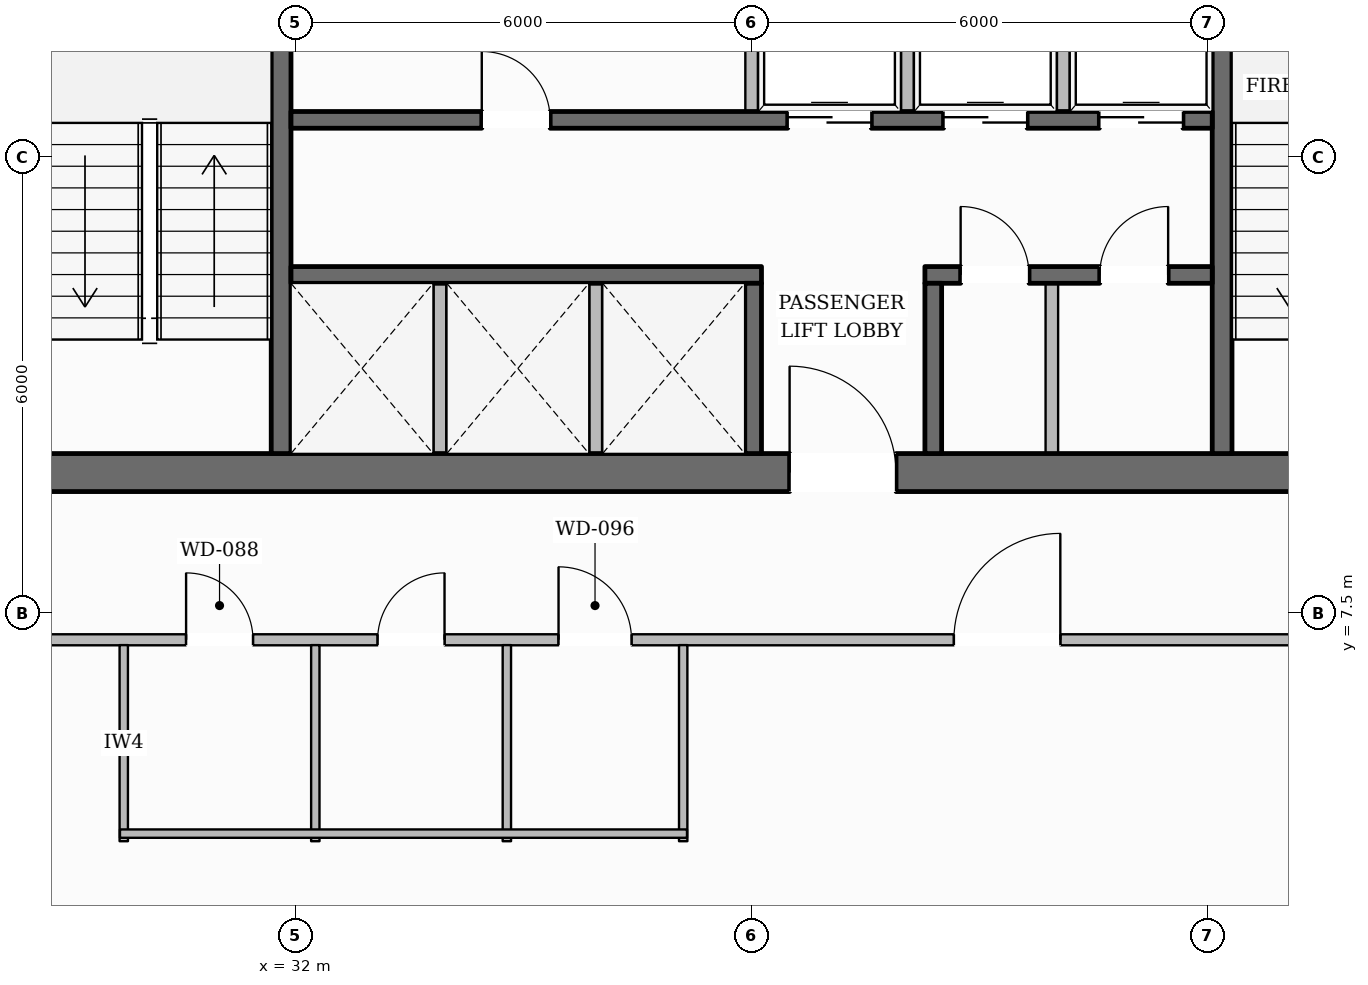
"""IFC4 building model, lengths in metres.
Left out: names, types, materials, properties, quantities, classifications, styles, units other than length and angle.
Written with IfcOpenShell. Run it as: python <this file> out.ifc"""

import sys

from ifc_helpers import new_model, si_unit, direction, frame, frame_2d, origin, place, context, subcontext, project, spatial, rectangle, extrude, element, fill, save


model = new_model("IFC4")
c1 = context("Model", 3, precision=1e-05, world=origin(), true_north=direction((0.0, 1.0)))
c2 = subcontext(c1, "Body", "Model", "MODEL_VIEW")
j1 = project(units=[si_unit("LENGTHUNIT", "METRE"), si_unit("PLANEANGLEUNIT", "RADIAN")], contexts=[c1])
p1 = place(None, origin())
s1 = spatial("IfcSite", under=j1, at=p1, CompositionType="ELEMENT")
p2 = place(p1, origin())
s2 = spatial("IfcBuilding", under=s1, at=p2, CompositionType="ELEMENT")
p3 = place(p2, frame((0.0, 0.0, 89.35)))
s3 = spatial("IfcBuildingStorey", under=s2, at=p3, CompositionType="ELEMENT", Elevation=89.35)
p4 = place(p3, frame((27.98, 9.35, 0.0), z_axis=(0.0, 0.0, 1.0), x_axis=(1.0, 0.0, 0.0)))
e1 = element("IfcWall", 1, at=p4, inside=s3, PredefinedType="SOLIDWALL", context=c2, shape_type="SweptSolid", body=[
    extrude(rectangle(XDim=20.04, YDim=0.5, at=frame_2d((10.02, 0.0))), origin(), (0.0, 0.0, 1.0), 3.6),
])
p5 = place(p4, frame((10.52, 0.0, 0.0)))
e2 = element("IfcOpeningElement", 2, at=p5, cuts=e1, PredefinedType="OPENING", context=c2, shape_type="SweptSolid", body=[
    extrude(rectangle(XDim=1.4, YDim=2.2, at=frame_2d((0.7, 1.1))), frame((0.0, 0.26, 0.0), z_axis=(0.0, -1.0, 0.0), x_axis=(1.0, 0.0, 0.0)), (0.0, 0.0, 1.0), 0.52),
])
p6 = place(p3, frame((31.81, 9.6, 0.0), z_axis=(0.0, 0.0, 1.0), x_axis=(0.0, 1.0, 0.0)))
e3 = element("IfcWall", 3, at=p6, inside=s3, PredefinedType="SHEAR", context=c2, shape_type="SweptSolid", body=[
    extrude(rectangle(XDim=13.0, YDim=0.26, at=frame_2d((6.5, 0.0))), origin(), (0.0, 0.0, 1.0), 3.6),
])
p7 = place(p6, frame((10.925, 0.0, 0.0)))
e4 = element("IfcOpeningElement", 4, at=p7, cuts=e3, PredefinedType="OPENING", context=c2, shape_type="SweptSolid", body=[
    extrude(rectangle(XDim=1.25, YDim=2.25, at=frame_2d((0.625, 1.125))), frame((0.0, 0.14, 0.0), z_axis=(0.0, -1.0, 0.0), x_axis=(1.0, 0.0, 0.0)), (0.0, 0.0, 1.0), 0.28),
])
p8 = place(p3, frame((44.19, 9.6, 0.0), z_axis=(0.0, 0.0, 1.0), x_axis=(0.0, 1.0, 0.0)))
e5 = element("IfcWall", 5, at=p8, inside=s3, PredefinedType="SHEAR", context=c2, shape_type="SweptSolid", body=[
    extrude(rectangle(XDim=13.0, YDim=0.26, at=frame_2d((6.5, 0.0))), origin(), (0.0, 0.0, 1.0), 3.6),
])
p9 = place(p8, frame((10.925, 0.0, 0.0)))
e6 = element("IfcOpeningElement", 6, at=p9, cuts=e5, PredefinedType="OPENING", context=c2, shape_type="SweptSolid", body=[
    extrude(rectangle(XDim=1.25, YDim=2.25, at=frame_2d((0.625, 1.125))), frame((0.0, 0.14, 0.0), z_axis=(0.0, -1.0, 0.0), x_axis=(1.0, 0.0, 0.0)), (0.0, 0.0, 1.0), 0.28),
])
p10 = place(p3, frame((31.94, 13.99, 0.0), z_axis=(0.0, 0.0, 1.0), x_axis=(1.0, 0.0, 0.0)))
e7 = element("IfcWall", 7, at=p10, inside=s3, PredefinedType="SOLIDWALL", context=c2, shape_type="SweptSolid", body=[
    extrude(rectangle(XDim=12.12, YDim=0.22, at=frame_2d((6.06, 0.0))), origin(), (0.0, 0.0, 1.0), 3.6),
])
p11 = place(p10, frame((2.51, 0.0, 0.0)))
e8 = element("IfcOpeningElement", 8, at=p11, cuts=e7, PredefinedType="OPENING", context=c2, shape_type="SweptSolid", body=[
    extrude(rectangle(XDim=0.9, YDim=2.1, at=frame_2d((0.45, 1.05))), frame((0.0, 0.12, 0.0), z_axis=(0.0, -1.0, 0.0), x_axis=(1.0, 0.0, 0.0)), (0.0, 0.0, 1.0), 0.24),
])
p12 = place(p10, frame((6.535, 0.0, 0.0)))
e9 = element("IfcOpeningElement", 9, at=p12, cuts=e7, PredefinedType="OPENING", context=c2, shape_type="SweptSolid", body=[
    extrude(rectangle(XDim=1.1, YDim=2.2, at=frame_2d((0.55, 1.1))), frame((0.0, 0.12, 0.0), z_axis=(0.0, -1.0, 0.0), x_axis=(1.0, 0.0, 0.0)), (0.0, 0.0, 1.0), 0.24),
])
p13 = place(p10, frame((8.585, 0.0, 0.0)))
e10 = element("IfcOpeningElement", 10, at=p13, cuts=e7, PredefinedType="OPENING", context=c2, shape_type="SweptSolid", body=[
    extrude(rectangle(XDim=1.1, YDim=2.2, at=frame_2d((0.55, 1.1))), frame((0.0, 0.12, 0.0), z_axis=(0.0, -1.0, 0.0), x_axis=(1.0, 0.0, 0.0)), (0.0, 0.0, 1.0), 0.24),
])
p14 = place(p10, frame((10.635, 0.0, 0.0)))
e11 = element("IfcOpeningElement", 11, at=p14, cuts=e7, PredefinedType="OPENING", context=c2, shape_type="SweptSolid", body=[
    extrude(rectangle(XDim=1.1, YDim=2.2, at=frame_2d((0.55, 1.1))), frame((0.0, 0.12, 0.0), z_axis=(0.0, -1.0, 0.0), x_axis=(1.0, 0.0, 0.0)), (0.0, 0.0, 1.0), 0.24),
])
p15 = place(p3, frame((31.94, 11.95, 0.0), z_axis=(0.0, 0.0, 1.0), x_axis=(1.0, 0.0, 0.0)))
e12 = element("IfcWall", 12, at=p15, inside=s3, PredefinedType="SOLIDWALL", context=c2, shape_type="SweptSolid", body=[
    extrude(rectangle(XDim=6.19, YDim=0.22, at=frame_2d((3.095, 0.0))), origin(), (0.0, 0.0, 1.0), 3.6),
])
p16 = place(p3, frame((40.28, 11.95, 0.0), z_axis=(0.0, 0.0, 1.0), x_axis=(1.0, 0.0, 0.0)))
e13 = element("IfcWall", 13, at=p16, inside=s3, PredefinedType="SOLIDWALL", context=c2, shape_type="SweptSolid", body=[
    extrude(rectangle(XDim=3.78, YDim=0.22, at=frame_2d((1.89, 0.0))), origin(), (0.0, 0.0, 1.0), 3.6),
])
p17 = place(p16, frame((0.47, 0.0, 0.0)))
e14 = element("IfcOpeningElement", 14, at=p17, cuts=e13, PredefinedType="OPENING", context=c2, shape_type="SweptSolid", body=[
    extrude(rectangle(XDim=0.9, YDim=2.1, at=frame_2d((0.45, 1.05))), frame((0.0, 0.12, 0.0), z_axis=(0.0, -1.0, 0.0), x_axis=(1.0, 0.0, 0.0)), (0.0, 0.0, 1.0), 0.24),
])
p18 = place(p16, frame((2.3, 0.0, 0.0)))
e15 = element("IfcOpeningElement", 15, at=p18, cuts=e13, PredefinedType="OPENING", context=c2, shape_type="SweptSolid", body=[
    extrude(rectangle(XDim=0.9, YDim=2.1, at=frame_2d((0.45, 1.05))), frame((0.0, 0.12, 0.0), z_axis=(0.0, -1.0, 0.0), x_axis=(1.0, 0.0, 0.0)), (0.0, 0.0, 1.0), 0.24),
])
for number, where, z_axis, x_axis in (
    (16, (38.02, 9.6, 0.0), (0.0, 0.0, 1.0), (0.0, 1.0, 0.0)),
    (17, (40.39, 9.6, 0.0), (0.0, 0.0, 1.0), (0.0, 1.0, 0.0)),
):
    element("IfcWall", number, at=place(p3, frame(where, z_axis=z_axis, x_axis=x_axis)), inside=s3, PredefinedType="SOLIDWALL", context=c2, shape_type="SweptSolid", body=[
        extrude(rectangle(XDim=2.24, YDim=0.22, at=frame_2d((1.12, 0.0))), origin(), (0.0, 0.0, 1.0), 3.6),
    ])
p19 = place(p3, frame((13.926, 13.506, 0.0), z_axis=(0.0, 0.0, 1.0), x_axis=(0.496286611319, 0.868158740914, 0.0)))
e18 = element("IfcWall", 18, at=p19, inside=s3, PredefinedType="STANDARD", context=c2, shape_type="SweptSolid", body=[
    extrude(rectangle(XDim=35.785, YDim=0.38, at=frame_2d((17.893, 0.0))), origin(), (0.0, 0.0, 1.0), 3.059),
])
p20 = place(p19, frame((31.63, 0.0, 0.65)))
e19 = element("IfcOpeningElement", 19, at=p20, cuts=e18, PredefinedType="OPENING", context=c2, shape_type="SweptSolid", body=[
    extrude(rectangle(XDim=1.55, YDim=1.75, at=frame_2d((0.775, 0.875))), frame((0.0, 0.2, 0.0), z_axis=(0.0, -1.0, 0.0), x_axis=(1.0, 0.0, 0.0)), (0.0, 0.0, 1.0), 0.4),
])
p21 = place(p19, frame((25.824, 0.0, 0.65)))
e20 = element("IfcOpeningElement", 20, at=p21, cuts=e18, PredefinedType="OPENING", context=c2, shape_type="SweptSolid", body=[
    extrude(rectangle(XDim=1.55, YDim=1.75, at=frame_2d((0.775, 0.875))), frame((0.0, 0.2, 0.0), z_axis=(0.0, -1.0, 0.0), x_axis=(1.0, 0.0, 0.0)), (0.0, 0.0, 1.0), 0.4),
])
p22 = place(p19, frame((20.018, 0.0, 0.65)))
e21 = element("IfcOpeningElement", 21, at=p22, cuts=e18, PredefinedType="OPENING", context=c2, shape_type="SweptSolid", body=[
    extrude(rectangle(XDim=1.55, YDim=1.75, at=frame_2d((0.775, 0.875))), frame((0.0, 0.2, 0.0), z_axis=(0.0, -1.0, 0.0), x_axis=(1.0, 0.0, 0.0)), (0.0, 0.0, 1.0), 0.4),
])
p23 = place(p19, frame((8.407, 0.0, 0.65)))
e22 = element("IfcOpeningElement", 22, at=p23, cuts=e18, PredefinedType="OPENING", context=c2, shape_type="SweptSolid", body=[
    extrude(rectangle(XDim=1.55, YDim=1.75, at=frame_2d((0.775, 0.875))), frame((0.0, 0.2, 0.0), z_axis=(0.0, -1.0, 0.0), x_axis=(1.0, 0.0, 0.0)), (0.0, 0.0, 1.0), 0.4),
])
p24 = place(p19, frame((2.601, 0.0, 0.65)))
e23 = element("IfcOpeningElement", 23, at=p24, cuts=e18, PredefinedType="OPENING", context=c2, shape_type="SweptSolid", body=[
    extrude(rectangle(XDim=1.55, YDim=1.75, at=frame_2d((0.775, 0.875))), frame((0.0, 0.2, 0.0), z_axis=(0.0, -1.0, 0.0), x_axis=(1.0, 0.0, 0.0)), (0.0, 0.0, 1.0), 0.4),
])
p25 = place(p3, frame((44.253, 44.609, 0.0), z_axis=(0.0, 0.0, 1.0), x_axis=(0.493917790196, -0.869508606356, 0.0)))
e24 = element("IfcWall", 24, at=p25, inside=s3, PredefinedType="STANDARD", context=c2, shape_type="SweptSolid", body=[
    extrude(rectangle(XDim=35.62, YDim=0.38, at=frame_2d((17.81, 0.0))), origin(), (0.0, 0.0, 1.0), 3.059),
])
p26 = place(p25, frame((8.505, 0.0, 0.0)))
e25 = element("IfcOpeningElement", 25, at=p26, cuts=e24, PredefinedType="OPENING", context=c2, shape_type="SweptSolid", body=[
    extrude(rectangle(XDim=1.0, YDim=2.2, at=frame_2d((0.5, 1.1))), frame((0.0, 0.2, 0.0), z_axis=(0.0, -1.0, 0.0), x_axis=(1.0, 0.0, 0.0)), (0.0, 0.0, 1.0), 0.4),
])
p27 = place(p25, frame((31.483, 0.0, 0.65)))
e26 = element("IfcOpeningElement", 26, at=p27, cuts=e24, PredefinedType="OPENING", context=c2, shape_type="SweptSolid", body=[
    extrude(rectangle(XDim=1.55, YDim=1.75, at=frame_2d((0.775, 0.875))), frame((0.0, 0.2, 0.0), z_axis=(0.0, -1.0, 0.0), x_axis=(1.0, 0.0, 0.0)), (0.0, 0.0, 1.0), 0.4),
])
p28 = place(p25, frame((25.705, 0.0, 0.65)))
e27 = element("IfcOpeningElement", 27, at=p28, cuts=e24, PredefinedType="OPENING", context=c2, shape_type="SweptSolid", body=[
    extrude(rectangle(XDim=1.55, YDim=1.75, at=frame_2d((0.775, 0.875))), frame((0.0, 0.2, 0.0), z_axis=(0.0, -1.0, 0.0), x_axis=(1.0, 0.0, 0.0)), (0.0, 0.0, 1.0), 0.4),
])
p29 = place(p25, frame((19.927, 0.0, 0.65)))
e28 = element("IfcOpeningElement", 28, at=p29, cuts=e24, PredefinedType="OPENING", context=c2, shape_type="SweptSolid", body=[
    extrude(rectangle(XDim=1.55, YDim=1.75, at=frame_2d((0.775, 0.875))), frame((0.0, 0.2, 0.0), z_axis=(0.0, -1.0, 0.0), x_axis=(1.0, 0.0, 0.0)), (0.0, 0.0, 1.0), 0.4),
])
p30 = place(p25, frame((2.594, 0.0, 0.65)))
e29 = element("IfcOpeningElement", 29, at=p30, cuts=e24, PredefinedType="OPENING", context=c2, shape_type="SweptSolid", body=[
    extrude(rectangle(XDim=1.55, YDim=1.75, at=frame_2d((0.775, 0.875))), frame((0.0, 0.2, 0.0), z_axis=(0.0, -1.0, 0.0), x_axis=(1.0, 0.0, 0.0)), (0.0, 0.0, 1.0), 0.4),
])
for number, where, z_axis, x_axis in (
    (30, (33.9, 9.55, 0.0), (0.0, 0.0, 1.0), (0.0, 1.0, 0.0)),
    (31, (35.95, 9.55, 0.0), (0.0, 0.0, 1.0), (0.0, 1.0, 0.0)),
):
    element("IfcWall", number, at=place(p3, frame(where, z_axis=z_axis, x_axis=x_axis)), inside=s3, PredefinedType="PARTITIONING", context=c2, shape_type="SweptSolid", body=[
        extrude(rectangle(XDim=2.29, YDim=0.165, at=frame_2d((1.145, 0.0))), origin(), (0.0, 0.0, 1.0), 3.6),
    ])
for number, where, z_axis, x_axis in (
    (32, (38.0, 14.1, 0.0), (0.0, 0.0, 1.0), (0.0, 1.0, 0.0)),
    (33, (40.05, 14.1, 0.0), (0.0, 0.0, 1.0), (0.0, 1.0, 0.0)),
    (34, (42.1, 14.1, 0.0), (0.0, 0.0, 1.0), (0.0, 1.0, 0.0)),
):
    element("IfcWall", number, at=place(p3, frame(where, z_axis=z_axis, x_axis=x_axis)), inside=s3, PredefinedType="PARTITIONING", context=c2, shape_type="SweptSolid", body=[
        extrude(rectangle(XDim=2.24, YDim=0.165, at=frame_2d((1.12, 0.0))), origin(), (0.0, 0.0, 1.0), 3.6),
    ])
p31 = place(p3, frame((41.95, 9.55, 0.0), z_axis=(0.0, 0.0, 1.0), x_axis=(0.0, 1.0, 0.0)))
e35 = element("IfcWall", 35, at=p31, inside=s3, PredefinedType="PARTITIONING", context=c2, shape_type="SweptSolid", body=[
    extrude(rectangle(XDim=2.29, YDim=0.165, at=frame_2d((1.145, 0.0))), origin(), (0.0, 0.0, 1.0), 3.6),
])
p32 = place(p3, frame((26.03, 7.15, 0.0), z_axis=(0.0, 0.0, 1.0), x_axis=(1.0, 0.0, 0.0)))
e36 = element("IfcWall", 36, at=p32, inside=s3, PredefinedType="PARTITIONING", context=c2, shape_type="SweptSolid", body=[
    extrude(rectangle(XDim=23.94, YDim=0.145, at=frame_2d((11.97, 0.0))), origin(), (0.0, 0.0, 1.0), 3.6),
])
p33 = place(p32, frame((4.53, 0.0, 0.0)))
e37 = element("IfcOpeningElement", 37, at=p33, cuts=e36, PredefinedType="OPENING", context=c2, shape_type="SweptSolid", body=[
    extrude(rectangle(XDim=0.88, YDim=2.1, at=frame_2d((0.44, 1.05))), frame((0.0, 0.083, 0.0), z_axis=(0.0, -1.0, 0.0), x_axis=(1.0, 0.0, 0.0)), (0.0, 0.0, 1.0), 0.165),
])
p34 = place(p32, frame((7.05, 0.0, 0.0)))
e38 = element("IfcOpeningElement", 38, at=p34, cuts=e36, PredefinedType="OPENING", context=c2, shape_type="SweptSolid", body=[
    extrude(rectangle(XDim=0.88, YDim=2.1, at=frame_2d((0.44, 1.05))), frame((0.0, 0.083, 0.0), z_axis=(0.0, -1.0, 0.0), x_axis=(1.0, 0.0, 0.0)), (0.0, 0.0, 1.0), 0.165),
])
p35 = place(p32, frame((9.43, 0.0, 0.0)))
e39 = element("IfcOpeningElement", 39, at=p35, cuts=e36, PredefinedType="OPENING", context=c2, shape_type="SweptSolid", body=[
    extrude(rectangle(XDim=0.96, YDim=2.1, at=frame_2d((0.48, 1.05))), frame((0.0, 0.083, 0.0), z_axis=(0.0, -1.0, 0.0), x_axis=(1.0, 0.0, 0.0)), (0.0, 0.0, 1.0), 0.165),
])
p36 = place(p32, frame((14.632, 0.0, 0.0)))
e40 = element("IfcOpeningElement", 40, at=p36, cuts=e36, PredefinedType="OPENING", context=c2, shape_type="SweptSolid", body=[
    extrude(rectangle(XDim=1.4, YDim=2.2, at=frame_2d((0.7, 1.1))), frame((0.0, 0.083, 0.0), z_axis=(0.0, -1.0, 0.0), x_axis=(1.0, 0.0, 0.0)), (0.0, 0.0, 1.0), 0.165),
])
p37 = place(p3, frame((29.74, 4.5, 0.0), z_axis=(0.0, 0.0, 1.0), x_axis=(0.0, 1.0, 0.0)))
e41 = element("IfcWall", 41, at=p37, inside=s3, PredefinedType="PLUMBINGWALL", context=c2, shape_type="SweptSolid", body=[
    extrude(rectangle(XDim=2.58, YDim=0.11, at=frame_2d((1.29, 0.0))), origin(), (0.0, 0.0, 1.0), 3.6),
])
p38 = place(p3, frame((32.26, 4.5, 0.0), z_axis=(0.0, 0.0, 1.0), x_axis=(0.0, 1.0, 0.0)))
e42 = element("IfcWall", 42, at=p38, inside=s3, PredefinedType="PLUMBINGWALL", context=c2, shape_type="SweptSolid", body=[
    extrude(rectangle(XDim=2.58, YDim=0.11, at=frame_2d((1.29, 0.0))), origin(), (0.0, 0.0, 1.0), 3.141),
])
for number, where, z_axis, x_axis in (
    (43, (34.78, 4.5, 0.0), (0.0, 0.0, 1.0), (0.0, 1.0, 0.0)),
    (44, (37.1, 4.5, 0.0), (0.0, 0.0, 1.0), (0.0, 1.0, 0.0)),
):
    element("IfcWall", number, at=place(p3, frame(where, z_axis=z_axis, x_axis=x_axis)), inside=s3, PredefinedType="PLUMBINGWALL", context=c2, shape_type="SweptSolid", body=[
        extrude(rectangle(XDim=2.58, YDim=0.11, at=frame_2d((1.29, 0.0))), origin(), (0.0, 0.0, 1.0), 3.6),
    ])
p39 = place(p3, frame((29.69, 4.6, 0.0), z_axis=(0.0, 0.0, 1.0), x_axis=(1.0, 0.0, 0.0)))
e45 = element("IfcWall", 45, at=p39, inside=s3, PredefinedType="PLUMBINGWALL", context=c2, shape_type="SweptSolid", body=[
    extrude(rectangle(XDim=7.46, YDim=0.11, at=frame_2d((3.73, 0.0))), origin(), (0.0, 0.0, 1.0), 3.6),
])
p40 = place(p5, origin())
e46 = element("IfcDoor", 46, at=p40, inside=s3, OperationType="SINGLE_SWING_LEFT", PredefinedType="DOOR", context=c2, shape_type="SweptSolid", body=[
    extrude(rectangle(XDim=1.4, YDim=2.2, at=frame_2d((0.7, 1.1))), frame((0.0, 0.025, 0.0), z_axis=(0.0, -1.0, 0.0), x_axis=(1.0, 0.0, 0.0)), (0.0, 0.0, 1.0), 0.05),
])
fill(e2, e46)
p41 = place(p11, origin())
e47 = element("IfcDoor", 47, at=p41, inside=s3, OperationType="SINGLE_SWING_LEFT", PredefinedType="DOOR", context=c2, shape_type="SweptSolid", body=[
    extrude(rectangle(XDim=0.9, YDim=2.1, at=frame_2d((0.45, 1.05))), frame((0.0, 0.025, 0.0), z_axis=(0.0, -1.0, 0.0), x_axis=(1.0, 0.0, 0.0)), (0.0, 0.0, 1.0), 0.05),
])
fill(e8, e47)
p42 = place(p12, origin())
e48 = element("IfcDoor", 48, at=p42, inside=s3, OperationType="DOUBLE_DOOR_SLIDING", PredefinedType="DOOR", context=c2, shape_type="SweptSolid", body=[
    extrude(rectangle(XDim=1.1, YDim=2.2, at=frame_2d((0.55, 1.1))), frame((0.0, 0.025, 0.0), z_axis=(0.0, -1.0, 0.0), x_axis=(1.0, 0.0, 0.0)), (0.0, 0.0, 1.0), 0.05),
])
fill(e9, e48)
p43 = place(p13, origin())
e49 = element("IfcDoor", 49, at=p43, inside=s3, OperationType="DOUBLE_DOOR_SLIDING", PredefinedType="DOOR", context=c2, shape_type="SweptSolid", body=[
    extrude(rectangle(XDim=1.1, YDim=2.2, at=frame_2d((0.55, 1.1))), frame((0.0, 0.025, 0.0), z_axis=(0.0, -1.0, 0.0), x_axis=(1.0, 0.0, 0.0)), (0.0, 0.0, 1.0), 0.05),
])
fill(e10, e49)
p44 = place(p14, origin())
e50 = element("IfcDoor", 50, at=p44, inside=s3, OperationType="DOUBLE_DOOR_SLIDING", PredefinedType="DOOR", context=c2, shape_type="SweptSolid", body=[
    extrude(rectangle(XDim=1.1, YDim=2.2, at=frame_2d((0.55, 1.1))), frame((0.0, 0.025, 0.0), z_axis=(0.0, -1.0, 0.0), x_axis=(1.0, 0.0, 0.0)), (0.0, 0.0, 1.0), 0.05),
])
fill(e11, e50)
p45 = place(p17, origin())
e51 = element("IfcDoor", 51, at=p45, inside=s3, OperationType="SINGLE_SWING_LEFT", PredefinedType="DOOR", context=c2, shape_type="SweptSolid", body=[
    extrude(rectangle(XDim=0.9, YDim=2.1, at=frame_2d((0.45, 1.05))), frame((0.0, 0.025, 0.0), z_axis=(0.0, -1.0, 0.0), x_axis=(1.0, 0.0, 0.0)), (0.0, 0.0, 1.0), 0.05),
])
fill(e14, e51)
p46 = place(p18, origin())
e52 = element("IfcDoor", 52, at=p46, inside=s3, OperationType="SINGLE_SWING_RIGHT", PredefinedType="DOOR", context=c2, shape_type="SweptSolid", body=[
    extrude(rectangle(XDim=0.9, YDim=2.1, at=frame_2d((0.45, 1.05))), frame((0.0, 0.025, 0.0), z_axis=(0.0, -1.0, 0.0), x_axis=(1.0, 0.0, 0.0)), (0.0, 0.0, 1.0), 0.05),
])
fill(e15, e52)
p47 = place(p33, origin())
e53 = element("IfcDoor", 53, at=p47, inside=s3, OperationType="SINGLE_SWING_LEFT", PredefinedType="DOOR", context=c2, shape_type="SweptSolid", body=[
    extrude(rectangle(XDim=0.88, YDim=2.1, at=frame_2d((0.44, 1.05))), frame((0.0, 0.025, 0.0), z_axis=(0.0, -1.0, 0.0), x_axis=(1.0, 0.0, 0.0)), (0.0, 0.0, 1.0), 0.05),
])
fill(e37, e53)
p48 = place(p34, origin())
e54 = element("IfcDoor", 54, at=p48, inside=s3, OperationType="SINGLE_SWING_RIGHT", PredefinedType="DOOR", context=c2, shape_type="SweptSolid", body=[
    extrude(rectangle(XDim=0.88, YDim=2.1, at=frame_2d((0.44, 1.05))), frame((0.0, 0.025, 0.0), z_axis=(0.0, -1.0, 0.0), x_axis=(1.0, 0.0, 0.0)), (0.0, 0.0, 1.0), 0.05),
])
fill(e38, e54)
p49 = place(p35, origin())
e55 = element("IfcDoor", 55, at=p49, inside=s3, OperationType="SINGLE_SWING_LEFT", PredefinedType="DOOR", context=c2, shape_type="SweptSolid", body=[
    extrude(rectangle(XDim=0.96, YDim=2.1, at=frame_2d((0.48, 1.05))), frame((0.0, 0.025, 0.0), z_axis=(0.0, -1.0, 0.0), x_axis=(1.0, 0.0, 0.0)), (0.0, 0.0, 1.0), 0.05),
])
fill(e39, e55)
p50 = place(p36, origin())
e56 = element("IfcDoor", 56, at=p50, inside=s3, OperationType="SINGLE_SWING_RIGHT", PredefinedType="DOOR", context=c2, shape_type="SweptSolid", body=[
    extrude(rectangle(XDim=1.4, YDim=2.2, at=frame_2d((0.7, 1.1))), frame((0.0, 0.025, 0.0), z_axis=(0.0, -1.0, 0.0), x_axis=(1.0, 0.0, 0.0)), (0.0, 0.0, 1.0), 0.05),
])
fill(e40, e56)
save(model, sys.argv[1])
